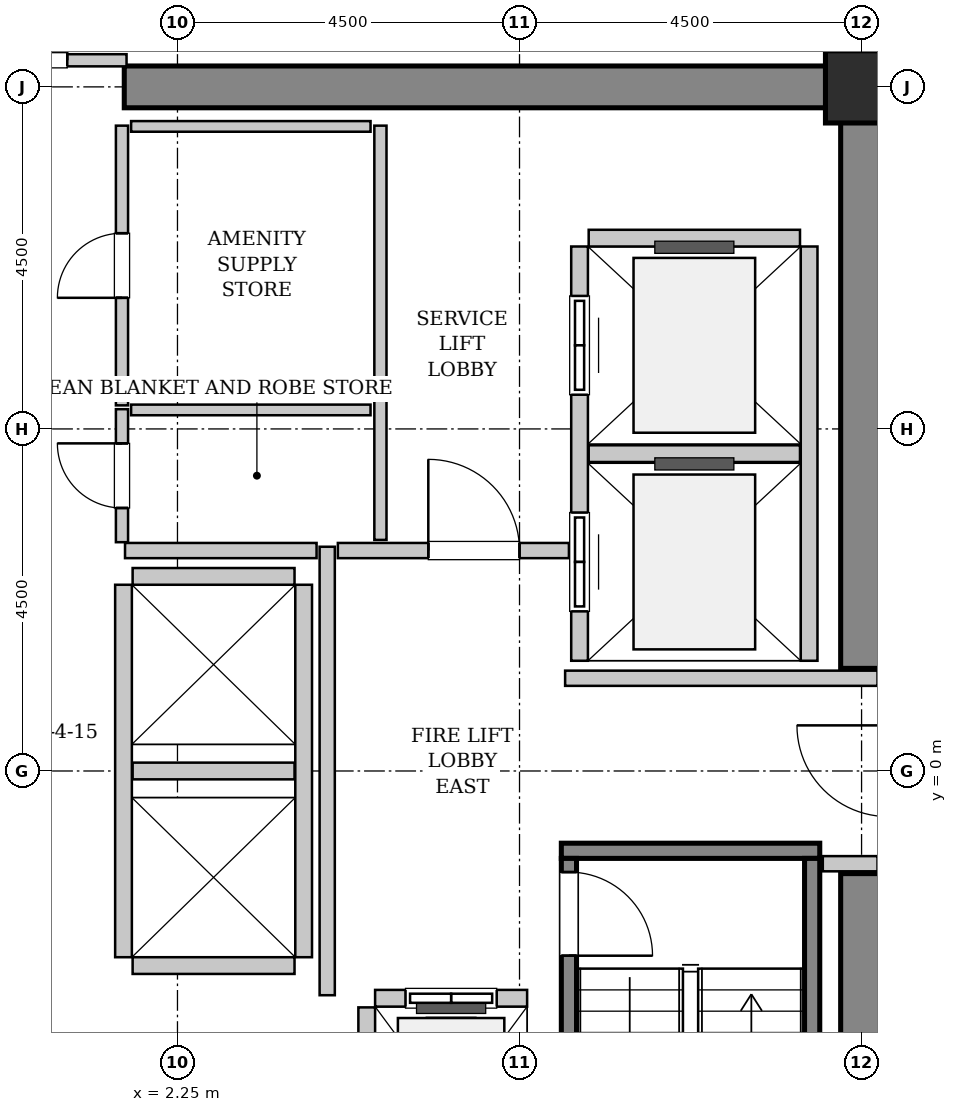
"""IFC4 building model, lengths in metres.
Left out: names, types, materials, properties, quantities, classifications, styles, units other than length and angle.
Written with IfcOpenShell. Run it as: python <this file> out.ifc"""

import sys

from ifc_helpers import new_model, si_unit, direction, frame, frame_2d, origin, origin_2d, place, context, subcontext, project, spatial, rectangle, hollow_rectangle, extrude, source, transform, mapped, element, fill, save


model = new_model("IFC4")
c1 = context("Model", 3, precision=1e-05, world=origin(), true_north=direction((0.0, 1.0)))
c2 = subcontext(c1, "Body", "Model", "MODEL_VIEW")
j1 = project(units=[si_unit("LENGTHUNIT", "METRE"), si_unit("PLANEANGLEUNIT", "RADIAN")], contexts=[c1])
p1 = place(None, origin())
s1 = spatial("IfcSite", under=j1, at=p1, CompositionType="ELEMENT")
p2 = place(p1, origin())
s2 = spatial("IfcBuilding", under=s1, at=p2, CompositionType="ELEMENT")
p3 = place(p2, frame((0.0, 0.0, 152.6)))
s3 = spatial("IfcBuildingStorey", under=s2, at=p3, CompositionType="ELEMENT", Elevation=152.6)
m1 = source(origin(), c2, "Body", "SweptSolid", [
    extrude(rectangle(XDim=9.975, YDim=0.55, at=frame_2d((4.987, 0.0))), origin(), (0.0, 0.0, 1.0), 3.8),
])
p4 = place(p3, frame((1.55, 9.0, 0.0), z_axis=(0.0, 0.0, 1.0), x_axis=(1.0, 0.0, 0.0)))
e1 = element("IfcWall", 1, at=p4, inside=s3, PredefinedType="SHEAR", context=c2, shape_type="MappedRepresentation", body=[
    mapped(m1, transform((0.0, 0.0, 0.0), x_axis=(1.0, 0.0, 0.0), y_axis=(0.0, 1.0, 0.0), z_axis=(0.0, 0.0, 1.0), scale=1.0)),
])
m2 = source(origin(), c2, "Body", "SweptSolid", [
    extrude(rectangle(XDim=7.375, YDim=0.55, at=frame_2d((3.688, 0.0))), origin(), (0.0, 0.0, 1.0), 3.8),
])
for number, where, z_axis, x_axis in (
    (2, (11.25, -8.725, 0.0), (0.0, 0.0, 1.0), (0.0, 1.0, 0.0)),
    (3, (11.25, 1.35, 0.0), (0.0, 0.0, 1.0), (0.0, 1.0, 0.0)),
):
    element("IfcWall", number, at=place(p3, frame(where, z_axis=z_axis, x_axis=x_axis)), inside=s3, PredefinedType="SHEAR", context=c2, shape_type="MappedRepresentation", body=[
        mapped(m2, transform((0.0, 0.0, 0.0), x_axis=(1.0, 0.0, 0.0), y_axis=(0.0, 1.0, 0.0), z_axis=(0.0, 0.0, 1.0), scale=1.0)),
    ])
m3 = source(origin(), c2, "Body", "SweptSolid", [
    extrude(hollow_rectangle(XDim=0.95, YDim=0.95, WallThickness=0.045, InnerFilletRadius=0.045, OuterFilletRadius=0.09, at=origin_2d()), origin(), (0.0, 0.0, 1.0), 3.8),
])
p5 = place(p3, frame((11.25, 9.0, 0.0), z_axis=(0.0, 0.0, 1.0), x_axis=(1.0, 0.0, 0.0)))
e4 = element("IfcColumn", 4, at=p5, inside=s3, PredefinedType="COLUMN", context=c2, shape_type="MappedRepresentation", body=[
    mapped(m3, transform((0.0, 0.0, 0.0), x_axis=(1.0, 0.0, 0.0), y_axis=(0.0, 1.0, 0.0), z_axis=(0.0, 0.0, 1.0), scale=1.0)),
])
m4 = source(origin(), c2, "Body", "SweptSolid", [
    extrude(rectangle(XDim=3.4, YDim=0.2, at=frame_2d((1.7, 0.0))), origin(), (0.0, 0.0, 1.0), 3.8),
])
p6 = place(p3, frame((7.3, -1.05, 0.0), z_axis=(0.0, 0.0, 1.0), x_axis=(1.0, 0.0, 0.0)))
e5 = element("IfcWall", 5, at=p6, inside=s3, PredefinedType="SOLIDWALL", context=c2, shape_type="MappedRepresentation", body=[
    mapped(m4, transform((0.0, 0.0, 0.0), x_axis=(1.0, 0.0, 0.0), y_axis=(0.0, 1.0, 0.0), z_axis=(0.0, 0.0, 1.0), scale=1.0)),
])
m5 = source(origin(), c2, "Body", "SweptSolid", [
    extrude(rectangle(XDim=7.1, YDim=0.2, at=frame_2d((3.55, 0.0))), origin(), (0.0, 0.0, 1.0), 3.8),
])
p7 = place(p3, frame((7.4, -1.15, 0.0), z_axis=(0.0, 0.0, 1.0), x_axis=(0.0, -1.0, 0.0)))
e6 = element("IfcWall", 6, at=p7, inside=s3, PredefinedType="SOLIDWALL", context=c2, shape_type="MappedRepresentation", body=[
    mapped(m5, transform((0.0, 0.0, 0.0), x_axis=(1.0, 0.0, 0.0), y_axis=(0.0, 1.0, 0.0), z_axis=(0.0, 0.0, 1.0), scale=1.0)),
])
p8 = place(p7, frame((0.18, 0.0, 0.0)))
e7 = element("IfcOpeningElement", 7, at=p8, cuts=e6, PredefinedType="OPENING", context=c2, shape_type="SweptSolid", body=[
    extrude(rectangle(XDim=1.1, YDim=2.15, at=frame_2d((0.55, 1.075))), frame((0.0, 0.11, 0.0), z_axis=(0.0, -1.0, 0.0), x_axis=(1.0, 0.0, 0.0)), (0.0, 0.0, 1.0), 0.22),
])
p9 = place(p3, frame((10.6, -1.15, 0.0), z_axis=(0.0, 0.0, 1.0), x_axis=(0.0, -1.0, 0.0)))
e8 = element("IfcWall", 8, at=p9, inside=s3, PredefinedType="SOLIDWALL", context=c2, shape_type="MappedRepresentation", body=[
    mapped(m5, transform((0.0, 0.0, 0.0), x_axis=(1.0, 0.0, 0.0), y_axis=(0.0, 1.0, 0.0), z_axis=(0.0, 0.0, 1.0), scale=1.0)),
])
m6 = source(origin(), c2, "Body", "SweptSolid", [
    extrude(rectangle(XDim=2.0, YDim=0.22, at=frame_2d((1.0, 0.0))), origin(), (0.0, 0.0, 1.0), 3.535),
])
p10 = place(p3, frame((6.85, -2.99, 0.0), z_axis=(0.0, 0.0, 1.0), x_axis=(-1.0, 0.0, 0.0)))
e9 = element("IfcWall", 9, at=p10, inside=s3, PredefinedType="SOLIDWALL", context=c2, shape_type="MappedRepresentation", body=[
    mapped(m6, transform((0.0, 0.0, 0.0), x_axis=(1.0, 0.0, 0.0), y_axis=(0.0, 1.0, 0.0), z_axis=(0.0, 0.0, 1.0), scale=1.0)),
])
p11 = place(p10, frame((0.4, 0.0, 0.0)))
e10 = element("IfcOpeningElement", 10, at=p11, cuts=e9, PredefinedType="OPENING", context=c2, shape_type="SweptSolid", body=[
    extrude(rectangle(XDim=1.2, YDim=2.2, at=frame_2d((0.6, 1.1))), frame((0.0, 0.12, 0.0), z_axis=(0.0, -1.0, 0.0), x_axis=(1.0, 0.0, 0.0)), (0.0, 0.0, 1.0), 0.24),
])
m7 = source(origin(), c2, "Body", "SweptSolid", [
    extrude(rectangle(XDim=2.68, YDim=0.22, at=frame_2d((1.34, 0.0))), origin(), (0.0, 0.0, 1.0), 3.535),
])
p12 = place(p3, frame((4.74, -3.11, 0.0), z_axis=(0.0, 0.0, 1.0), x_axis=(0.0, -1.0, 0.0)))
e11 = element("IfcWall", 11, at=p12, inside=s3, PredefinedType="SOLIDWALL", context=c2, shape_type="MappedRepresentation", body=[
    mapped(m7, transform((0.0, 0.0, 0.0), x_axis=(1.0, 0.0, 0.0), y_axis=(0.0, 1.0, 0.0), z_axis=(0.0, 0.0, 1.0), scale=1.0)),
])
m8 = source(origin(), c2, "Body", "SweptSolid", [
    extrude(rectangle(XDim=5.45, YDim=0.22, at=frame_2d((2.725, 0.0))), origin(), (0.0, 0.0, 1.0), 3.535),
])
p13 = place(p3, frame((7.54, 6.9, 0.0), z_axis=(0.0, 0.0, 1.0), x_axis=(0.0, -1.0, 0.0)))
e12 = element("IfcWall", 12, at=p13, inside=s3, PredefinedType="SOLIDWALL", context=c2, shape_type="MappedRepresentation", body=[
    mapped(m8, transform((0.0, 0.0, 0.0), x_axis=(1.0, 0.0, 0.0), y_axis=(0.0, 1.0, 0.0), z_axis=(0.0, 0.0, 1.0), scale=1.0)),
])
p14 = place(p13, frame((3.5, 0.0, 0.0)))
e13 = element("IfcOpeningElement", 13, at=p14, cuts=e12, PredefinedType="OPENING", context=c2, shape_type="SweptSolid", body=[
    extrude(rectangle(XDim=1.3, YDim=2.3, at=frame_2d((0.65, 1.15))), frame((0.0, 0.12, 0.0), z_axis=(0.0, -1.0, 0.0), x_axis=(1.0, 0.0, 0.0)), (0.0, 0.0, 1.0), 0.24),
])
p15 = place(p13, frame((0.65, 0.0, 0.0)))
e14 = element("IfcOpeningElement", 14, at=p15, cuts=e12, PredefinedType="OPENING", context=c2, shape_type="SweptSolid", body=[
    extrude(rectangle(XDim=1.3, YDim=2.3, at=frame_2d((0.65, 1.15))), frame((0.0, 0.12, 0.0), z_axis=(0.0, -1.0, 0.0), x_axis=(1.0, 0.0, 0.0)), (0.0, 0.0, 1.0), 0.24),
])
p16 = place(p3, frame((10.56, 1.45, 0.0), z_axis=(0.0, 0.0, 1.0), x_axis=(0.0, 1.0, 0.0)))
e15 = element("IfcWall", 15, at=p16, inside=s3, PredefinedType="SOLIDWALL", context=c2, shape_type="MappedRepresentation", body=[
    mapped(m8, transform((0.0, 0.0, 0.0), x_axis=(1.0, 0.0, 0.0), y_axis=(0.0, 1.0, 0.0), z_axis=(0.0, 0.0, 1.0), scale=1.0)),
])
m9 = source(origin(), c2, "Body", "SweptSolid", [
    extrude(rectangle(XDim=2.78, YDim=0.22, at=frame_2d((1.39, 0.0))), origin(), (0.0, 0.0, 1.0), 3.535),
])
for number, where, z_axis, x_axis in (
    (16, (7.66, 4.175, 0.0), (0.0, 0.0, 1.0), (1.0, 0.0, 0.0)),
    (17, (10.44, 7.01, 0.0), (0.0, 0.0, 1.0), (-1.0, 0.0, 0.0)),
):
    element("IfcWall", number, at=place(p3, frame(where, z_axis=z_axis, x_axis=x_axis)), inside=s3, PredefinedType="SOLIDWALL", context=c2, shape_type="MappedRepresentation", body=[
        mapped(m9, transform((0.0, 0.0, 0.0), x_axis=(1.0, 0.0, 0.0), y_axis=(0.0, 1.0, 0.0), z_axis=(0.0, 0.0, 1.0), scale=1.0)),
    ])
m10 = source(origin(), c2, "Body", "SweptSolid", [
    extrude(rectangle(XDim=4.9, YDim=0.22, at=frame_2d((2.45, 0.0))), origin(), (0.0, 0.0, 1.0), 3.535),
])
for number, where, z_axis, x_axis in (
    (18, (1.54, 2.45, 0.0), (0.0, 0.0, 1.0), (0.0, -1.0, 0.0)),
    (19, (3.91, -2.45, 0.0), (0.0, 0.0, 1.0), (0.0, 1.0, 0.0)),
):
    element("IfcWall", number, at=place(p3, frame(where, z_axis=z_axis, x_axis=x_axis)), inside=s3, PredefinedType="SOLIDWALL", context=c2, shape_type="MappedRepresentation", body=[
        mapped(m10, transform((0.0, 0.0, 0.0), x_axis=(1.0, 0.0, 0.0), y_axis=(0.0, 1.0, 0.0), z_axis=(0.0, 0.0, 1.0), scale=1.0)),
    ])
m11 = source(origin(), c2, "Body", "SweptSolid", [
    extrude(rectangle(XDim=2.13, YDim=0.22, at=frame_2d((1.065, 0.0))), origin(), (0.0, 0.0, 1.0), 3.535),
])
for number, where, z_axis, x_axis in (
    (20, (1.66, -2.56, 0.0), (0.0, 0.0, 1.0), (1.0, 0.0, 0.0)),
    (21, (1.66, 0.0, 0.0), (0.0, 0.0, 1.0), (1.0, 0.0, 0.0)),
    (22, (3.79, 2.56, 0.0), (0.0, 0.0, 1.0), (-1.0, 0.0, 0.0)),
):
    element("IfcWall", number, at=place(p3, frame(where, z_axis=z_axis, x_axis=x_axis)), inside=s3, PredefinedType="SOLIDWALL", context=c2, shape_type="MappedRepresentation", body=[
        mapped(m11, transform((0.0, 0.0, 0.0), x_axis=(1.0, 0.0, 0.0), y_axis=(0.0, 1.0, 0.0), z_axis=(0.0, 0.0, 1.0), scale=1.0)),
    ])
m12 = source(origin(), c2, "Body", "SweptSolid", [
    extrude(rectangle(XDim=5.9, YDim=0.2, at=frame_2d((2.95, 0.0))), origin(), (0.0, 0.0, 1.0), 3.535),
])
p17 = place(p3, frame((4.22, -2.95, 0.0), z_axis=(0.0, 0.0, 1.0), x_axis=(0.0, 1.0, 0.0)))
e23 = element("IfcWall", 23, at=p17, inside=s3, PredefinedType="PARTITIONING", context=c2, shape_type="MappedRepresentation", body=[
    mapped(m12, transform((0.0, 0.0, 0.0), x_axis=(1.0, 0.0, 0.0), y_axis=(0.0, 1.0, 0.0), z_axis=(0.0, 0.0, 1.0), scale=1.0)),
])
m13 = source(origin(), c2, "Body", "SweptSolid", [
    extrude(rectangle(XDim=2.52, YDim=0.2, at=frame_2d((1.26, 0.0))), origin(), (0.0, 0.0, 1.0), 3.535),
])
p18 = place(p3, frame((1.56, 2.9, 0.0), z_axis=(0.0, 0.0, 1.0), x_axis=(1.0, 0.0, 0.0)))
e24 = element("IfcWall", 24, at=p18, inside=s3, PredefinedType="PARTITIONING", context=c2, shape_type="MappedRepresentation", body=[
    mapped(m13, transform((0.0, 0.0, 0.0), x_axis=(1.0, 0.0, 0.0), y_axis=(0.0, 1.0, 0.0), z_axis=(0.0, 0.0, 1.0), scale=1.0)),
])
m14 = source(origin(), c2, "Body", "SweptSolid", [
    extrude(rectangle(XDim=3.04, YDim=0.2, at=frame_2d((1.52, 0.0))), origin(), (0.0, 0.0, 1.0), 3.535),
])
p19 = place(p3, frame((4.36, 2.9, 0.0), z_axis=(0.0, 0.0, 1.0), x_axis=(1.0, 0.0, 0.0)))
e25 = element("IfcWall", 25, at=p19, inside=s3, PredefinedType="PARTITIONING", context=c2, shape_type="MappedRepresentation", body=[
    mapped(m14, transform((0.0, 0.0, 0.0), x_axis=(1.0, 0.0, 0.0), y_axis=(0.0, 1.0, 0.0), z_axis=(0.0, 0.0, 1.0), scale=1.0)),
])
p20 = place(p19, frame((1.19, 0.0, 0.0)))
e26 = element("IfcOpeningElement", 26, at=p20, cuts=e25, PredefinedType="OPENING", context=c2, shape_type="SweptSolid", body=[
    extrude(rectangle(XDim=1.2, YDim=2.15, at=frame_2d((0.6, 1.075))), frame((0.0, 0.11, 0.0), z_axis=(0.0, -1.0, 0.0), x_axis=(1.0, 0.0, 0.0)), (0.0, 0.0, 1.0), 0.22),
])
m15 = source(origin(), c2, "Body", "SweptSolid", [
    extrude(rectangle(XDim=4.11, YDim=0.2, at=frame_2d((2.055, 0.0))), origin(), (0.0, 0.0, 1.0), 3.535),
])
p21 = place(p3, frame((7.35, 1.22, 0.0), z_axis=(0.0, 0.0, 1.0), x_axis=(1.0, 0.0, 0.0)))
e27 = element("IfcWall", 27, at=p21, inside=s3, PredefinedType="PARTITIONING", context=c2, shape_type="MappedRepresentation", body=[
    mapped(m15, transform((0.0, 0.0, 0.0), x_axis=(1.0, 0.0, 0.0), y_axis=(0.0, 1.0, 0.0), z_axis=(0.0, 0.0, 1.0), scale=1.0)),
])
m16 = source(origin(), c2, "Body", "SweptSolid", [
    extrude(rectangle(XDim=0.72, YDim=0.2, at=frame_2d((0.36, 0.0))), origin(), (0.0, 0.0, 1.0), 3.535),
])
p22 = place(p3, frame((10.74, -1.22, 0.0), z_axis=(0.0, 0.0, 1.0), x_axis=(1.0, 0.0, 0.0)))
e28 = element("IfcWall", 28, at=p22, inside=s3, PredefinedType="PARTITIONING", context=c2, shape_type="MappedRepresentation", body=[
    mapped(m16, transform((0.0, 0.0, 0.0), x_axis=(1.0, 0.0, 0.0), y_axis=(0.0, 1.0, 0.0), z_axis=(0.0, 0.0, 1.0), scale=1.0)),
])
m17 = source(origin(), c2, "Body", "SweptSolid", [
    extrude(rectangle(XDim=3.16, YDim=0.16, at=frame_2d((1.58, 0.0))), origin(), (0.0, 0.0, 1.0), 2.425),
])
p23 = place(p3, frame((-1.58, 9.35, 0.0), z_axis=(0.0, 0.0, 1.0), x_axis=(1.0, 0.0, 0.0)))
e29 = element("IfcWall", 29, at=p23, inside=s3, PredefinedType="PARTITIONING", context=c2, shape_type="MappedRepresentation", body=[
    mapped(m17, transform((0.0, 0.0, 0.0), x_axis=(1.0, 0.0, 0.0), y_axis=(0.0, 1.0, 0.0), z_axis=(0.0, 0.0, 1.0), scale=1.0)),
])
p24 = place(p23, frame((0.78, 0.0, 0.0)))
e30 = element("IfcOpeningElement", 30, at=p24, cuts=e29, PredefinedType="OPENING", context=c2, shape_type="SweptSolid", body=[
    extrude(rectangle(XDim=1.6, YDim=2.3, at=frame_2d((0.8, 1.15))), frame((0.0, 0.09, 0.0), z_axis=(0.0, -1.0, 0.0), x_axis=(1.0, 0.0, 0.0)), (0.0, 0.0, 1.0), 0.18),
])
m18 = source(origin(), c2, "Body", "SweptSolid", [
    extrude(rectangle(XDim=5.45, YDim=0.16, at=frame_2d((2.725, 0.0))), origin(), (0.0, 0.0, 1.0), 3.535),
])
p25 = place(p3, frame((4.92, 3.04, 0.0), z_axis=(0.0, 0.0, 1.0), x_axis=(0.0, 1.0, 0.0)))
e31 = element("IfcWall", 31, at=p25, inside=s3, PredefinedType="PARTITIONING", context=c2, shape_type="MappedRepresentation", body=[
    mapped(m18, transform((0.0, 0.0, 0.0), x_axis=(1.0, 0.0, 0.0), y_axis=(0.0, 1.0, 0.0), z_axis=(0.0, 0.0, 1.0), scale=1.0)),
])
m19 = source(origin(), c2, "Body", "SweptSolid", [
    extrude(rectangle(XDim=1.75, YDim=0.16, at=frame_2d((0.875, 0.0))), origin(), (0.0, 0.0, 1.0), 3.535),
])
p26 = place(p3, frame((1.52, 3.01, 0.0), z_axis=(0.0, 0.0, 1.0), x_axis=(0.0, 1.0, 0.0)))
e32 = element("IfcWall", 32, at=p26, inside=s3, PredefinedType="PARTITIONING", context=c2, shape_type="MappedRepresentation", body=[
    mapped(m19, transform((0.0, 0.0, 0.0), x_axis=(1.0, 0.0, 0.0), y_axis=(0.0, 1.0, 0.0), z_axis=(0.0, 0.0, 1.0), scale=1.0)),
])
p27 = place(p26, frame((0.45, 0.0, 0.0)))
e33 = element("IfcOpeningElement", 33, at=p27, cuts=e32, PredefinedType="OPENING", context=c2, shape_type="SweptSolid", body=[
    extrude(rectangle(XDim=0.85, YDim=2.1, at=frame_2d((0.425, 1.05))), frame((0.0, 0.09, 0.0), z_axis=(0.0, -1.0, 0.0), x_axis=(1.0, 0.0, 0.0)), (0.0, 0.0, 1.0), 0.18),
])
m20 = source(origin(), c2, "Body", "SweptSolid", [
    extrude(rectangle(XDim=3.15, YDim=0.14, at=frame_2d((1.575, 0.0))), origin(), (0.0, 0.0, 1.0), 3.535),
])
p28 = place(p3, frame((1.64, 4.75, 0.0), z_axis=(0.0, 0.0, 1.0), x_axis=(1.0, 0.0, 0.0)))
e34 = element("IfcWall", 34, at=p28, inside=s3, PredefinedType="PARTITIONING", context=c2, shape_type="MappedRepresentation", body=[
    mapped(m20, transform((0.0, 0.0, 0.0), x_axis=(1.0, 0.0, 0.0), y_axis=(0.0, 1.0, 0.0), z_axis=(0.0, 0.0, 1.0), scale=1.0)),
])
m21 = source(origin(), c2, "Body", "SweptSolid", [
    extrude(rectangle(XDim=3.68, YDim=0.16, at=frame_2d((1.84, 0.0))), origin(), (0.0, 0.0, 1.0), 3.535),
])
p29 = place(p3, frame((1.52, 4.81, 0.0), z_axis=(0.0, 0.0, 1.0), x_axis=(0.0, 1.0, 0.0)))
e35 = element("IfcWall", 35, at=p29, inside=s3, PredefinedType="PARTITIONING", context=c2, shape_type="MappedRepresentation", body=[
    mapped(m21, transform((0.0, 0.0, 0.0), x_axis=(1.0, 0.0, 0.0), y_axis=(0.0, 1.0, 0.0), z_axis=(0.0, 0.0, 1.0), scale=1.0)),
])
p30 = place(p29, frame((1.415, 0.0, 0.0)))
e36 = element("IfcOpeningElement", 36, at=p30, cuts=e35, PredefinedType="OPENING", context=c2, shape_type="SweptSolid", body=[
    extrude(rectangle(XDim=0.85, YDim=2.1, at=frame_2d((0.425, 1.05))), frame((0.0, 0.09, 0.0), z_axis=(0.0, -1.0, 0.0), x_axis=(1.0, 0.0, 0.0)), (0.0, 0.0, 1.0), 0.18),
])
p31 = place(p3, frame((1.64, 8.48, 0.0), z_axis=(0.0, 0.0, 1.0), x_axis=(1.0, 0.0, 0.0)))
e37 = element("IfcWall", 37, at=p31, inside=s3, PredefinedType="PARTITIONING", context=c2, shape_type="MappedRepresentation", body=[
    mapped(m20, transform((0.0, 0.0, 0.0), x_axis=(1.0, 0.0, 0.0), y_axis=(0.0, 1.0, 0.0), z_axis=(0.0, 0.0, 1.0), scale=1.0)),
])
m22 = source(origin(), c2, "Body", "SweptSolid", [
    extrude(rectangle(XDim=1.1, YDim=2.15, at=frame_2d((0.55, 1.075))), frame((0.0, 0.025, 0.0), z_axis=(0.0, -1.0, 0.0), x_axis=(1.0, 0.0, 0.0)), (0.0, 0.0, 1.0), 0.05),
])
p32 = place(p8, origin())
e38 = element("IfcDoor", 38, at=p32, inside=s3, OperationType="SINGLE_SWING_RIGHT", PredefinedType="DOOR", context=c2, shape_type="MappedRepresentation", body=[
    mapped(m22, transform((0.0, 0.0, 0.0), x_axis=(1.0, 0.0, 0.0), y_axis=(0.0, 1.0, 0.0), z_axis=(0.0, 0.0, 1.0), scale=1.0)),
])
fill(e7, e38)
m23 = source(origin(), c2, "Body", "SweptSolid", [
    extrude(rectangle(XDim=1.2, YDim=2.2, at=frame_2d((0.6, 1.1))), frame((0.0, 0.025, 0.0), z_axis=(0.0, -1.0, 0.0), x_axis=(1.0, 0.0, 0.0)), (0.0, 0.0, 1.0), 0.05),
])
p33 = place(p11, origin())
e39 = element("IfcDoor", 39, at=p33, inside=s3, OperationType="SLIDING_TO_LEFT", PredefinedType="DOOR", context=c2, shape_type="MappedRepresentation", body=[
    mapped(m23, transform((0.0, 0.0, 0.0), x_axis=(1.0, 0.0, 0.0), y_axis=(0.0, 1.0, 0.0), z_axis=(0.0, 0.0, 1.0), scale=1.0)),
])
fill(e10, e39)
m24 = source(origin(), c2, "Body", "SweptSolid", [
    extrude(rectangle(XDim=1.3, YDim=2.3, at=frame_2d((0.65, 1.15))), frame((0.0, 0.025, 0.0), z_axis=(0.0, -1.0, 0.0), x_axis=(1.0, 0.0, 0.0)), (0.0, 0.0, 1.0), 0.05),
])
p34 = place(p14, origin())
e40 = element("IfcDoor", 40, at=p34, inside=s3, OperationType="SLIDING_TO_RIGHT", PredefinedType="DOOR", context=c2, shape_type="MappedRepresentation", body=[
    mapped(m24, transform((0.0, 0.0, 0.0), x_axis=(1.0, 0.0, 0.0), y_axis=(0.0, 1.0, 0.0), z_axis=(0.0, 0.0, 1.0), scale=1.0)),
])
fill(e13, e40)
p35 = place(p15, origin())
e41 = element("IfcDoor", 41, at=p35, inside=s3, OperationType="SLIDING_TO_RIGHT", PredefinedType="DOOR", context=c2, shape_type="MappedRepresentation", body=[
    mapped(m24, transform((0.0, 0.0, 0.0), x_axis=(1.0, 0.0, 0.0), y_axis=(0.0, 1.0, 0.0), z_axis=(0.0, 0.0, 1.0), scale=1.0)),
])
fill(e14, e41)
m25 = source(origin(), c2, "Body", "SweptSolid", [
    extrude(rectangle(XDim=1.2, YDim=2.15, at=frame_2d((0.6, 1.075))), frame((0.0, 0.025, 0.0), z_axis=(0.0, -1.0, 0.0), x_axis=(1.0, 0.0, 0.0)), (0.0, 0.0, 1.0), 0.05),
])
p36 = place(p20, origin())
e42 = element("IfcDoor", 42, at=p36, inside=s3, OperationType="SINGLE_SWING_LEFT", PredefinedType="DOOR", context=c2, shape_type="MappedRepresentation", body=[
    mapped(m25, transform((0.0, 0.0, 0.0), x_axis=(1.0, 0.0, 0.0), y_axis=(0.0, 1.0, 0.0), z_axis=(0.0, 0.0, 1.0), scale=1.0)),
])
fill(e26, e42)
m26 = source(origin(), c2, "Body", "SweptSolid", [
    extrude(rectangle(XDim=1.6, YDim=2.3, at=frame_2d((0.8, 1.15))), frame((0.0, 0.025, 0.0), z_axis=(0.0, -1.0, 0.0), x_axis=(1.0, 0.0, 0.0)), (0.0, 0.0, 1.0), 0.05),
])
p37 = place(p24, origin())
e43 = element("IfcDoor", 43, at=p37, inside=s3, OperationType="DOUBLE_DOOR_SINGLE_SWING", PredefinedType="DOOR", context=c2, shape_type="MappedRepresentation", body=[
    mapped(m26, transform((0.0, 0.0, 0.0), x_axis=(1.0, 0.0, 0.0), y_axis=(0.0, 1.0, 0.0), z_axis=(0.0, 0.0, 1.0), scale=1.0)),
])
fill(e30, e43)
m27 = source(origin(), c2, "Body", "SweptSolid", [
    extrude(rectangle(XDim=0.85, YDim=2.1, at=frame_2d((0.425, 1.05))), frame((0.0, 0.025, 0.0), z_axis=(0.0, -1.0, 0.0), x_axis=(1.0, 0.0, 0.0)), (0.0, 0.0, 1.0), 0.05),
])
p38 = place(p27, origin())
e44 = element("IfcDoor", 44, at=p38, inside=s3, OperationType="SINGLE_SWING_RIGHT", PredefinedType="DOOR", context=c2, shape_type="MappedRepresentation", body=[
    mapped(m27, transform((0.0, 0.0, 0.0), x_axis=(1.0, 0.0, 0.0), y_axis=(0.0, 1.0, 0.0), z_axis=(0.0, 0.0, 1.0), scale=1.0)),
])
fill(e33, e44)
p39 = place(p30, origin())
e45 = element("IfcDoor", 45, at=p39, inside=s3, OperationType="SINGLE_SWING_LEFT", PredefinedType="DOOR", context=c2, shape_type="MappedRepresentation", body=[
    mapped(m27, transform((0.0, 0.0, 0.0), x_axis=(1.0, 0.0, 0.0), y_axis=(0.0, 1.0, 0.0), z_axis=(0.0, 0.0, 1.0), scale=1.0)),
])
fill(e36, e45)
save(model, sys.argv[1])
